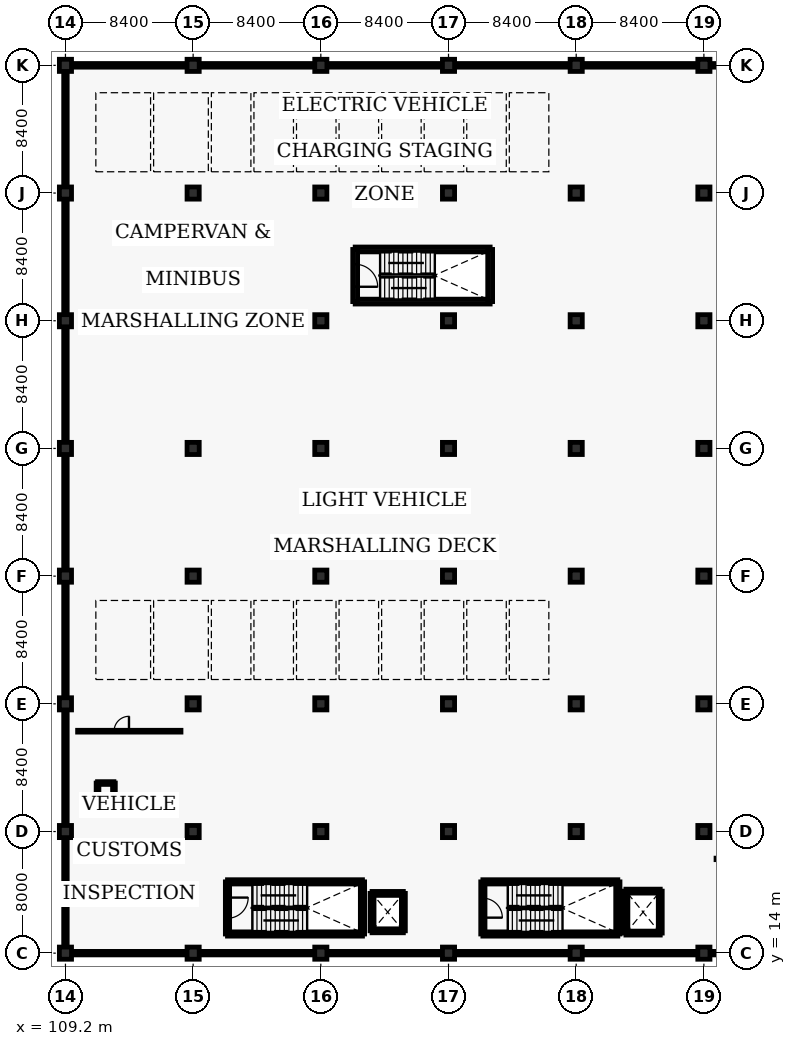
"""IFC4 building model, lengths in metres.
Left out: names, types, materials, properties, quantities, classifications, styles, units other than length and angle.
Written with IfcOpenShell. Run it as: python <this file> out.ifc"""

import sys

from ifc_helpers import new_model, si_unit, direction, frame, frame_2d, origin, origin_2d, place, context, subcontext, project, spatial, rectangle, extrude, element, fill, save


model = new_model("IFC4")
c1 = context("Model", 3, precision=1e-05, world=origin(), true_north=direction((0.0, 1.0)))
c2 = subcontext(c1, "Body", "Model", "MODEL_VIEW")
j1 = project(units=[si_unit("LENGTHUNIT", "METRE"), si_unit("PLANEANGLEUNIT", "RADIAN")], contexts=[c1])
p1 = place(None, origin())
s1 = spatial("IfcSite", under=j1, at=p1, CompositionType="ELEMENT")
p2 = place(p1, origin())
s2 = spatial("IfcBuilding", under=s1, at=p2, CompositionType="ELEMENT")
p3 = place(p2, frame((0.0, 0.0, 5.44)))
s3 = spatial("IfcBuildingStorey", under=s2, at=p3, CompositionType="ELEMENT", Elevation=5.44)
for number, where, z_axis, x_axis in (
    (1, (109.2, 14.0, 0.0), (0.0, 0.0, 1.0), (1.0, 0.0, 0.0)),
    (2, (109.2, 22.0, 0.0), (0.0, 0.0, 1.0), (1.0, 0.0, 0.0)),
    (3, (109.2, 30.4, 0.0), (0.0, 0.0, 1.0), (1.0, 0.0, 0.0)),
    (4, (109.2, 38.8, 0.0), (0.0, 0.0, 1.0), (1.0, 0.0, 0.0)),
    (5, (109.2, 47.2, 0.0), (0.0, 0.0, 1.0), (1.0, 0.0, 0.0)),
    (6, (109.2, 55.6, 0.0), (0.0, 0.0, 1.0), (1.0, 0.0, 0.0)),
    (7, (109.2, 64.0, 0.0), (0.0, 0.0, 1.0), (1.0, 0.0, 0.0)),
    (8, (109.2, 72.4, 0.0), (0.0, 0.0, 1.0), (1.0, 0.0, 0.0)),
    (9, (117.6, 14.0, 0.0), (0.0, 0.0, 1.0), (1.0, 0.0, 0.0)),
    (10, (117.6, 22.0, 0.0), (0.0, 0.0, 1.0), (1.0, 0.0, 0.0)),
    (11, (117.6, 30.4, 0.0), (0.0, 0.0, 1.0), (1.0, 0.0, 0.0)),
    (12, (117.6, 38.8, 0.0), (0.0, 0.0, 1.0), (1.0, 0.0, 0.0)),
    (13, (117.6, 47.2, 0.0), (0.0, 0.0, 1.0), (1.0, 0.0, 0.0)),
    (14, (117.6, 55.6, 0.0), (0.0, 0.0, 1.0), (1.0, 0.0, 0.0)),
    (15, (117.6, 64.0, 0.0), (0.0, 0.0, 1.0), (1.0, 0.0, 0.0)),
    (16, (117.6, 72.4, 0.0), (0.0, 0.0, 1.0), (1.0, 0.0, 0.0)),
    (17, (126.0, 14.0, 0.0), (0.0, 0.0, 1.0), (1.0, 0.0, 0.0)),
    (18, (126.0, 22.0, 0.0), (0.0, 0.0, 1.0), (1.0, 0.0, 0.0)),
    (19, (126.0, 30.4, 0.0), (0.0, 0.0, 1.0), (1.0, 0.0, 0.0)),
    (20, (126.0, 38.8, 0.0), (0.0, 0.0, 1.0), (1.0, 0.0, 0.0)),
    (21, (126.0, 47.2, 0.0), (0.0, 0.0, 1.0), (1.0, 0.0, 0.0)),
    (22, (126.0, 55.6, 0.0), (0.0, 0.0, 1.0), (1.0, 0.0, 0.0)),
    (23, (126.0, 64.0, 0.0), (0.0, 0.0, 1.0), (1.0, 0.0, 0.0)),
    (24, (126.0, 72.4, 0.0), (0.0, 0.0, 1.0), (1.0, 0.0, 0.0)),
    (25, (134.4, 14.0, 0.0), (0.0, 0.0, 1.0), (1.0, 0.0, 0.0)),
    (26, (134.4, 22.0, 0.0), (0.0, 0.0, 1.0), (1.0, 0.0, 0.0)),
    (27, (134.4, 30.4, 0.0), (0.0, 0.0, 1.0), (1.0, 0.0, 0.0)),
    (28, (134.4, 38.8, 0.0), (0.0, 0.0, 1.0), (1.0, 0.0, 0.0)),
    (29, (134.4, 47.2, 0.0), (0.0, 0.0, 1.0), (1.0, 0.0, 0.0)),
    (30, (134.4, 55.6, 0.0), (0.0, 0.0, 1.0), (1.0, 0.0, 0.0)),
    (31, (134.4, 64.0, 0.0), (0.0, 0.0, 1.0), (1.0, 0.0, 0.0)),
    (32, (134.4, 72.4, 0.0), (0.0, 0.0, 1.0), (1.0, 0.0, 0.0)),
    (33, (142.8, 14.0, 0.0), (0.0, 0.0, 1.0), (1.0, 0.0, 0.0)),
    (34, (142.8, 22.0, 0.0), (0.0, 0.0, 1.0), (1.0, 0.0, 0.0)),
    (35, (142.8, 30.4, 0.0), (0.0, 0.0, 1.0), (1.0, 0.0, 0.0)),
    (36, (142.8, 38.8, 0.0), (0.0, 0.0, 1.0), (1.0, 0.0, 0.0)),
    (37, (142.8, 47.2, 0.0), (0.0, 0.0, 1.0), (1.0, 0.0, 0.0)),
    (38, (142.8, 55.6, 0.0), (0.0, 0.0, 1.0), (1.0, 0.0, 0.0)),
    (39, (142.8, 64.0, 0.0), (0.0, 0.0, 1.0), (1.0, 0.0, 0.0)),
    (40, (142.8, 72.4, 0.0), (0.0, 0.0, 1.0), (1.0, 0.0, 0.0)),
    (41, (151.2, 14.0, 0.0), (0.0, 0.0, 1.0), (1.0, 0.0, 0.0)),
    (42, (151.2, 22.0, 0.0), (0.0, 0.0, 1.0), (1.0, 0.0, 0.0)),
    (43, (151.2, 30.4, 0.0), (0.0, 0.0, 1.0), (1.0, 0.0, 0.0)),
    (44, (151.2, 38.8, 0.0), (0.0, 0.0, 1.0), (1.0, 0.0, 0.0)),
    (45, (151.2, 47.2, 0.0), (0.0, 0.0, 1.0), (1.0, 0.0, 0.0)),
    (46, (151.2, 55.6, 0.0), (0.0, 0.0, 1.0), (1.0, 0.0, 0.0)),
    (47, (151.2, 64.0, 0.0), (0.0, 0.0, 1.0), (1.0, 0.0, 0.0)),
    (48, (151.2, 72.4, 0.0), (0.0, 0.0, 1.0), (1.0, 0.0, 0.0)),
):
    element("IfcColumn", number, at=place(p3, frame(where, z_axis=z_axis, x_axis=x_axis)), inside=s3, PredefinedType="COLUMN", context=c2, shape_type="SweptSolid", body=[
        extrude(rectangle(XDim=0.8, YDim=0.8, at=origin_2d()), origin(), (0.0, 0.0, 1.0), 4.16),
    ])
for number, where, z_axis, x_axis in (
    (49, (109.6, 14.0, 0.0), (0.0, 0.0, 1.0), (1.0, 0.0, 0.0)),
    (50, (109.6, 72.4, 0.0), (0.0, 0.0, 1.0), (1.0, 0.0, 0.0)),
):
    element("IfcWall", number, at=place(p3, frame(where, z_axis=z_axis, x_axis=x_axis)), inside=s3, PredefinedType="PARAPET", context=c2, shape_type="SweptSolid", body=[
        extrude(rectangle(XDim=7.6, YDim=0.23, at=frame_2d((3.8, 0.0))), origin(), (0.0, 0.0, 1.0), 1.15),
    ])
for number, where, z_axis, x_axis in (
    (51, (118.0, 14.0, 0.0), (0.0, 0.0, 1.0), (1.0, 0.0, 0.0)),
    (52, (118.0, 72.4, 0.0), (0.0, 0.0, 1.0), (1.0, 0.0, 0.0)),
    (53, (126.4, 14.0, 0.0), (0.0, 0.0, 1.0), (1.0, 0.0, 0.0)),
    (54, (126.4, 72.4, 0.0), (0.0, 0.0, 1.0), (1.0, 0.0, 0.0)),
):
    element("IfcWall", number, at=place(p3, frame(where, z_axis=z_axis, x_axis=x_axis)), inside=s3, PredefinedType="PARAPET", context=c2, shape_type="SweptSolid", body=[
        extrude(rectangle(XDim=7.6, YDim=0.23, at=frame_2d((3.8, 0.0))), origin(), (0.0, 0.0, 1.0), 1.15),
    ])
for number, where, z_axis, x_axis in (
    (55, (134.8, 14.0, 0.0), (0.0, 0.0, 1.0), (1.0, 0.0, 0.0)),
    (56, (134.8, 72.4, 0.0), (0.0, 0.0, 1.0), (1.0, 0.0, 0.0)),
):
    element("IfcWall", number, at=place(p3, frame(where, z_axis=z_axis, x_axis=x_axis)), inside=s3, PredefinedType="PARAPET", context=c2, shape_type="SweptSolid", body=[
        extrude(rectangle(XDim=7.6, YDim=0.23, at=frame_2d((3.8, 0.0))), origin(), (0.0, 0.0, 1.0), 1.15),
    ])
for number, where, z_axis, x_axis in (
    (57, (143.2, 14.0, 0.0), (0.0, 0.0, 1.0), (1.0, 0.0, 0.0)),
    (58, (143.2, 72.4, 0.0), (0.0, 0.0, 1.0), (1.0, 0.0, 0.0)),
):
    element("IfcWall", number, at=place(p3, frame(where, z_axis=z_axis, x_axis=x_axis)), inside=s3, PredefinedType="PARAPET", context=c2, shape_type="SweptSolid", body=[
        extrude(rectangle(XDim=7.6, YDim=0.23, at=frame_2d((3.8, 0.0))), origin(), (0.0, 0.0, 1.0), 1.15),
    ])
for number, where, z_axis, x_axis in (
    (59, (151.6, 14.0, 0.0), (0.0, 0.0, 1.0), (1.0, 0.0, 0.0)),
    (60, (151.6, 72.4, 0.0), (0.0, 0.0, 1.0), (1.0, 0.0, 0.0)),
):
    element("IfcWall", number, at=place(p3, frame(where, z_axis=z_axis, x_axis=x_axis)), inside=s3, PredefinedType="PARAPET", context=c2, shape_type="SweptSolid", body=[
        extrude(rectangle(XDim=7.6, YDim=0.23, at=frame_2d((3.8, 0.0))), origin(), (0.0, 0.0, 1.0), 1.15),
    ])
p4 = place(p3, frame((109.2, 14.4, 0.0), z_axis=(0.0, 0.0, 1.0), x_axis=(0.0, 1.0, 0.0)))
e61 = element("IfcWall", 61, at=p4, inside=s3, PredefinedType="PARAPET", context=c2, shape_type="SweptSolid", body=[
    extrude(rectangle(XDim=7.2, YDim=0.23, at=frame_2d((3.6, 0.0))), origin(), (0.0, 0.0, 1.0), 1.15),
])
p5 = place(p3, frame((109.2, 22.4, 0.0), z_axis=(0.0, 0.0, 1.0), x_axis=(0.0, 1.0, 0.0)))
e62 = element("IfcWall", 62, at=p5, inside=s3, PredefinedType="PARAPET", context=c2, shape_type="SweptSolid", body=[
    extrude(rectangle(XDim=7.6, YDim=0.23, at=frame_2d((3.8, 0.0))), origin(), (0.0, 0.0, 1.0), 1.15),
])
p6 = place(p3, frame((109.2, 30.8, 0.0), z_axis=(0.0, 0.0, 1.0), x_axis=(0.0, 1.0, 0.0)))
e63 = element("IfcWall", 63, at=p6, inside=s3, PredefinedType="PARAPET", context=c2, shape_type="SweptSolid", body=[
    extrude(rectangle(XDim=7.6, YDim=0.23, at=frame_2d((3.8, 0.0))), origin(), (0.0, 0.0, 1.0), 1.15),
])
p7 = place(p3, frame((109.2, 39.2, 0.0), z_axis=(0.0, 0.0, 1.0), x_axis=(0.0, 1.0, 0.0)))
e64 = element("IfcWall", 64, at=p7, inside=s3, PredefinedType="PARAPET", context=c2, shape_type="SweptSolid", body=[
    extrude(rectangle(XDim=7.6, YDim=0.23, at=frame_2d((3.8, 0.0))), origin(), (0.0, 0.0, 1.0), 1.15),
])
p8 = place(p3, frame((109.2, 47.6, 0.0), z_axis=(0.0, 0.0, 1.0), x_axis=(0.0, 1.0, 0.0)))
e65 = element("IfcWall", 65, at=p8, inside=s3, PredefinedType="PARAPET", context=c2, shape_type="SweptSolid", body=[
    extrude(rectangle(XDim=7.6, YDim=0.23, at=frame_2d((3.8, 0.0))), origin(), (0.0, 0.0, 1.0), 1.15),
])
for number, where, z_axis, x_axis in (
    (66, (109.2, 56.0, 0.0), (0.0, 0.0, 1.0), (0.0, 1.0, 0.0)),
    (67, (109.2, 64.4, 0.0), (0.0, 0.0, 1.0), (0.0, 1.0, 0.0)),
):
    element("IfcWall", number, at=place(p3, frame(where, z_axis=z_axis, x_axis=x_axis)), inside=s3, PredefinedType="PARAPET", context=c2, shape_type="SweptSolid", body=[
        extrude(rectangle(XDim=7.6, YDim=0.23, at=frame_2d((3.8, 0.0))), origin(), (0.0, 0.0, 1.0), 1.15),
    ])
for number, where, z_axis, x_axis in (
    (68, (119.86, 15.26, 0.0), (0.0, 0.0, 1.0), (1.0, 0.0, 0.0)),
    (69, (119.86, 18.69, 0.0), (0.0, 0.0, 1.0), (1.0, 0.0, 0.0)),
):
    element("IfcWall", number, at=place(p3, frame(where, z_axis=z_axis, x_axis=x_axis)), inside=s3, PredefinedType="SHEAR", context=c2, shape_type="SweptSolid", body=[
        extrude(rectangle(XDim=8.88, YDim=0.28, at=frame_2d((4.44, 0.0))), origin(), (0.0, 0.0, 1.0), 4.16),
    ])
p9 = place(p3, frame((119.86, 18.69, 0.0), z_axis=(0.0, 0.0, 1.0), x_axis=(0.0, -1.0, 0.0)))
e70 = element("IfcWall", 70, at=p9, inside=s3, PredefinedType="SHEAR", context=c2, shape_type="SweptSolid", body=[
    extrude(rectangle(XDim=3.43, YDim=0.28, at=frame_2d((1.715, 0.0))), origin(), (0.0, 0.0, 1.0), 4.16),
])
p10 = place(p9, frame((1.035, 0.0, 0.0)))
e71 = element("IfcOpeningElement", 71, at=p10, cuts=e70, PredefinedType="OPENING", context=c2, shape_type="SweptSolid", body=[
    extrude(rectangle(XDim=1.36, YDim=2.15, at=frame_2d((0.68, 1.075))), frame((0.0, 0.15, 0.0), z_axis=(0.0, -1.0, 0.0), x_axis=(1.0, 0.0, 0.0)), (0.0, 0.0, 1.0), 0.3),
])
p11 = place(p3, frame((128.74, 15.26, 0.0), z_axis=(0.0, 0.0, 1.0), x_axis=(0.0, 1.0, 0.0)))
e72 = element("IfcWall", 72, at=p11, inside=s3, PredefinedType="SHEAR", context=c2, shape_type="SweptSolid", body=[
    extrude(rectangle(XDim=3.43, YDim=0.28, at=frame_2d((1.715, 0.0))), origin(), (0.0, 0.0, 1.0), 4.16),
])
p12 = place(p3, frame((129.37, 15.47, 0.0), z_axis=(0.0, 0.0, 1.0), x_axis=(1.0, 0.0, 0.0)))
e73 = element("IfcWall", 73, at=p12, inside=s3, PredefinedType="SHEAR", context=c2, shape_type="SweptSolid", body=[
    extrude(rectangle(XDim=2.06, YDim=0.26, at=frame_2d((1.03, 0.0))), origin(), (0.0, 0.0, 1.0), 4.16),
])
for number, where, z_axis, x_axis in (
    (74, (131.43, 15.47, 0.0), (0.0, 0.0, 1.0), (0.0, 1.0, 0.0)),
    (75, (129.37, 17.93, 0.0), (0.0, 0.0, 1.0), (0.0, -1.0, 0.0)),
):
    element("IfcWall", number, at=place(p3, frame(where, z_axis=z_axis, x_axis=x_axis)), inside=s3, PredefinedType="SHEAR", context=c2, shape_type="SweptSolid", body=[
        extrude(rectangle(XDim=2.46, YDim=0.26, at=frame_2d((1.23, 0.0))), origin(), (0.0, 0.0, 1.0), 4.16),
    ])
p13 = place(p3, frame((129.37, 17.93, 0.0), z_axis=(0.0, 0.0, 1.0), x_axis=(1.0, 0.0, 0.0)))
e76 = element("IfcWall", 76, at=p13, inside=s3, PredefinedType="SHEAR", context=c2, shape_type="SweptSolid", body=[
    extrude(rectangle(XDim=2.06, YDim=0.26, at=frame_2d((1.03, 0.0))), origin(), (0.0, 0.0, 1.0), 4.16),
])
p14 = place(p13, frame((0.46, 0.0, 0.0)))
e77 = element("IfcOpeningElement", 77, at=p14, cuts=e76, PredefinedType="OPENING", context=c2, shape_type="SweptSolid", body=[
    extrude(rectangle(XDim=1.14, YDim=2.14, at=frame_2d((0.57, 1.07))), frame((0.0, 0.14, 0.0), z_axis=(0.0, -1.0, 0.0), x_axis=(1.0, 0.0, 0.0)), (0.0, 0.0, 1.0), 0.28),
])
for number, where, z_axis, x_axis in (
    (78, (136.66, 15.26, 0.0), (0.0, 0.0, 1.0), (1.0, 0.0, 0.0)),
    (79, (136.66, 18.69, 0.0), (0.0, 0.0, 1.0), (1.0, 0.0, 0.0)),
):
    element("IfcWall", number, at=place(p3, frame(where, z_axis=z_axis, x_axis=x_axis)), inside=s3, PredefinedType="SHEAR", context=c2, shape_type="SweptSolid", body=[
        extrude(rectangle(XDim=8.88, YDim=0.28, at=frame_2d((4.44, 0.0))), origin(), (0.0, 0.0, 1.0), 4.16),
    ])
p15 = place(p3, frame((136.66, 18.69, 0.0), z_axis=(0.0, 0.0, 1.0), x_axis=(0.0, -1.0, 0.0)))
e80 = element("IfcWall", 80, at=p15, inside=s3, PredefinedType="SHEAR", context=c2, shape_type="SweptSolid", body=[
    extrude(rectangle(XDim=3.43, YDim=0.28, at=frame_2d((1.715, 0.0))), origin(), (0.0, 0.0, 1.0), 4.16),
])
p16 = place(p15, frame((1.075, 0.0, 0.0)))
e81 = element("IfcOpeningElement", 81, at=p16, cuts=e80, PredefinedType="OPENING", context=c2, shape_type="SweptSolid", body=[
    extrude(rectangle(XDim=1.28, YDim=2.1, at=frame_2d((0.64, 1.05))), frame((0.0, 0.15, 0.0), z_axis=(0.0, -1.0, 0.0), x_axis=(1.0, 0.0, 0.0)), (0.0, 0.0, 1.0), 0.3),
])
p17 = place(p3, frame((145.54, 15.26, 0.0), z_axis=(0.0, 0.0, 1.0), x_axis=(0.0, 1.0, 0.0)))
e82 = element("IfcWall", 82, at=p17, inside=s3, PredefinedType="SHEAR", context=c2, shape_type="SweptSolid", body=[
    extrude(rectangle(XDim=3.43, YDim=0.28, at=frame_2d((1.715, 0.0))), origin(), (0.0, 0.0, 1.0), 4.16),
])
p18 = place(p3, frame((146.07, 15.32, 0.0), z_axis=(0.0, 0.0, 1.0), x_axis=(1.0, 0.0, 0.0)))
e83 = element("IfcWall", 83, at=p18, inside=s3, PredefinedType="SHEAR", context=c2, shape_type="SweptSolid", body=[
    extrude(rectangle(XDim=2.26, YDim=0.26, at=frame_2d((1.13, 0.0))), origin(), (0.0, 0.0, 1.0), 4.16),
])
for number, where, z_axis, x_axis in (
    (84, (148.33, 15.32, 0.0), (0.0, 0.0, 1.0), (0.0, 1.0, 0.0)),
    (85, (146.07, 18.08, 0.0), (0.0, 0.0, 1.0), (0.0, -1.0, 0.0)),
):
    element("IfcWall", number, at=place(p3, frame(where, z_axis=z_axis, x_axis=x_axis)), inside=s3, PredefinedType="SHEAR", context=c2, shape_type="SweptSolid", body=[
        extrude(rectangle(XDim=2.76, YDim=0.26, at=frame_2d((1.38, 0.0))), origin(), (0.0, 0.0, 1.0), 4.16),
    ])
p19 = place(p3, frame((146.07, 18.08, 0.0), z_axis=(0.0, 0.0, 1.0), x_axis=(1.0, 0.0, 0.0)))
e86 = element("IfcWall", 86, at=p19, inside=s3, PredefinedType="SHEAR", context=c2, shape_type="SweptSolid", body=[
    extrude(rectangle(XDim=2.26, YDim=0.26, at=frame_2d((1.13, 0.0))), origin(), (0.0, 0.0, 1.0), 4.16),
])
p20 = place(p19, frame((0.51, 0.0, 0.0)))
e87 = element("IfcOpeningElement", 87, at=p20, cuts=e86, PredefinedType="OPENING", context=c2, shape_type="SweptSolid", body=[
    extrude(rectangle(XDim=1.24, YDim=2.14, at=frame_2d((0.62, 1.07))), frame((0.0, 0.14, 0.0), z_axis=(0.0, -1.0, 0.0), x_axis=(1.0, 0.0, 0.0)), (0.0, 0.0, 1.0), 0.28),
])
for number, where, z_axis, x_axis in (
    (88, (128.26, 56.86, 0.0), (0.0, 0.0, 1.0), (1.0, 0.0, 0.0)),
    (89, (128.26, 60.29, 0.0), (0.0, 0.0, 1.0), (1.0, 0.0, 0.0)),
):
    element("IfcWall", number, at=place(p3, frame(where, z_axis=z_axis, x_axis=x_axis)), inside=s3, PredefinedType="SHEAR", context=c2, shape_type="SweptSolid", body=[
        extrude(rectangle(XDim=8.88, YDim=0.32, at=frame_2d((4.44, 0.0))), origin(), (0.0, 0.0, 1.0), 4.16),
    ])
p21 = place(p3, frame((128.26, 60.29, 0.0), z_axis=(0.0, 0.0, 1.0), x_axis=(0.0, -1.0, 0.0)))
e90 = element("IfcWall", 90, at=p21, inside=s3, PredefinedType="SHEAR", context=c2, shape_type="SweptSolid", body=[
    extrude(rectangle(XDim=3.43, YDim=0.32, at=frame_2d((1.715, 0.0))), origin(), (0.0, 0.0, 1.0), 4.16),
])
p22 = place(p21, frame((0.975, 0.0, 0.0)))
e91 = element("IfcOpeningElement", 91, at=p22, cuts=e90, PredefinedType="OPENING", context=c2, shape_type="SweptSolid", body=[
    extrude(rectangle(XDim=1.48, YDim=2.15, at=frame_2d((0.74, 1.075))), frame((0.0, 0.17, 0.0), z_axis=(0.0, -1.0, 0.0), x_axis=(1.0, 0.0, 0.0)), (0.0, 0.0, 1.0), 0.34),
])
p23 = place(p3, frame((137.14, 56.86, 0.0), z_axis=(0.0, 0.0, 1.0), x_axis=(0.0, 1.0, 0.0)))
e92 = element("IfcWall", 92, at=p23, inside=s3, PredefinedType="SHEAR", context=c2, shape_type="SweptSolid", body=[
    extrude(rectangle(XDim=3.43, YDim=0.32, at=frame_2d((1.715, 0.0))), origin(), (0.0, 0.0, 1.0), 4.16),
])
for number, where, z_axis, x_axis in (
    (93, (111.31, 24.11, 0.0), (0.0, 0.0, 1.0), (1.0, 0.0, 0.0)),
    (94, (112.39, 24.11, 0.0), (0.0, 0.0, 1.0), (0.0, 1.0, 0.0)),
    (95, (112.39, 25.19, 0.0), (0.0, 0.0, 1.0), (-1.0, 0.0, 0.0)),
    (96, (111.31, 25.19, 0.0), (0.0, 0.0, 1.0), (0.0, -1.0, 0.0)),
):
    element("IfcWall", number, at=place(p3, frame(where, z_axis=z_axis, x_axis=x_axis)), inside=s3, PredefinedType="SOLIDWALL", context=c2, shape_type="SweptSolid", body=[
        extrude(rectangle(XDim=1.08, YDim=0.18, at=frame_2d((0.54, 0.0))), origin(), (0.0, 0.0, 1.0), 2.6),
    ])
p24 = place(p3, frame((110.0, 28.6, 0.0), z_axis=(0.0, 0.0, 1.0), x_axis=(1.0, 0.0, 0.0)))
e97 = element("IfcWall", 97, at=p24, inside=s3, PredefinedType="PARTITIONING", context=c2, shape_type="SweptSolid", body=[
    extrude(rectangle(XDim=6.8, YDim=0.12, at=frame_2d((3.4, 0.0))), origin(), (0.0, 0.0, 1.0), 2.9),
])
p25 = place(p24, frame((2.4, 0.0, 0.0)))
e98 = element("IfcOpeningElement", 98, at=p25, cuts=e97, PredefinedType="OPENING", context=c2, shape_type="SweptSolid", body=[
    extrude(rectangle(XDim=0.98, YDim=2.12, at=frame_2d((0.49, 1.06))), frame((0.0, 0.07, 0.0), z_axis=(0.0, -1.0, 0.0), x_axis=(1.0, 0.0, 0.0)), (0.0, 0.0, 1.0), 0.14),
])
p26 = place(p3, frame((152.0, 20.2, 0.0), z_axis=(0.0, 0.0, 1.0), x_axis=(1.0, 0.0, 0.0)))
e99 = element("IfcWall", 99, at=p26, inside=s3, PredefinedType="PARTITIONING", context=c2, shape_type="SweptSolid", body=[
    extrude(rectangle(XDim=15.2, YDim=0.1, at=frame_2d((7.6, 0.0))), origin(), (0.0, 0.0, 1.0), 2.9),
])
p27 = place(p26, frame((2.4, 0.0, 0.0)))
e100 = element("IfcOpeningElement", 100, at=p27, cuts=e99, PredefinedType="OPENING", context=c2, shape_type="SweptSolid", body=[
    extrude(rectangle(XDim=1.06, YDim=2.1, at=frame_2d((0.53, 1.05))), frame((0.0, 0.06, 0.0), z_axis=(0.0, -1.0, 0.0), x_axis=(1.0, 0.0, 0.0)), (0.0, 0.0, 1.0), 0.12),
])
p28 = place(p10, origin())
e101 = element("IfcDoor", 101, at=p28, inside=s3, OperationType="SINGLE_SWING_LEFT", PredefinedType="DOOR", context=c2, shape_type="SweptSolid", body=[
    extrude(rectangle(XDim=1.36, YDim=2.15, at=frame_2d((0.68, 1.075))), frame((0.0, 0.025, 0.0), z_axis=(0.0, -1.0, 0.0), x_axis=(1.0, 0.0, 0.0)), (0.0, 0.0, 1.0), 0.05),
])
fill(e71, e101)
p29 = place(p14, origin())
e102 = element("IfcDoor", 102, at=p29, inside=s3, OperationType="DOUBLE_DOOR_SLIDING", PredefinedType="DOOR", context=c2, shape_type="SweptSolid", body=[
    extrude(rectangle(XDim=1.14, YDim=2.14, at=frame_2d((0.57, 1.07))), frame((0.0, 0.025, 0.0), z_axis=(0.0, -1.0, 0.0), x_axis=(1.0, 0.0, 0.0)), (0.0, 0.0, 1.0), 0.05),
])
fill(e77, e102)
p30 = place(p16, origin())
e103 = element("IfcDoor", 103, at=p30, inside=s3, OperationType="SINGLE_SWING_RIGHT", PredefinedType="DOOR", context=c2, shape_type="SweptSolid", body=[
    extrude(rectangle(XDim=1.28, YDim=2.1, at=frame_2d((0.64, 1.05))), frame((0.0, 0.025, 0.0), z_axis=(0.0, -1.0, 0.0), x_axis=(1.0, 0.0, 0.0)), (0.0, 0.0, 1.0), 0.05),
])
fill(e81, e103)
p31 = place(p20, origin())
e104 = element("IfcDoor", 104, at=p31, inside=s3, OperationType="DOUBLE_DOOR_SLIDING", PredefinedType="DOOR", context=c2, shape_type="SweptSolid", body=[
    extrude(rectangle(XDim=1.24, YDim=2.14, at=frame_2d((0.62, 1.07))), frame((0.0, 0.025, 0.0), z_axis=(0.0, -1.0, 0.0), x_axis=(1.0, 0.0, 0.0)), (0.0, 0.0, 1.0), 0.05),
])
fill(e87, e104)
p32 = place(p22, origin())
e105 = element("IfcDoor", 105, at=p32, inside=s3, OperationType="SINGLE_SWING_RIGHT", PredefinedType="DOOR", context=c2, shape_type="SweptSolid", body=[
    extrude(rectangle(XDim=1.48, YDim=2.15, at=frame_2d((0.74, 1.075))), frame((0.0, 0.025, 0.0), z_axis=(0.0, -1.0, 0.0), x_axis=(1.0, 0.0, 0.0)), (0.0, 0.0, 1.0), 0.05),
])
fill(e91, e105)
p33 = place(p25, origin())
e106 = element("IfcDoor", 106, at=p33, inside=s3, OperationType="SINGLE_SWING_RIGHT", PredefinedType="DOOR", context=c2, shape_type="SweptSolid", body=[
    extrude(rectangle(XDim=0.98, YDim=2.12, at=frame_2d((0.49, 1.06))), frame((0.0, 0.025, 0.0), z_axis=(0.0, -1.0, 0.0), x_axis=(1.0, 0.0, 0.0)), (0.0, 0.0, 1.0), 0.05),
])
fill(e98, e106)
save(model, sys.argv[1])
